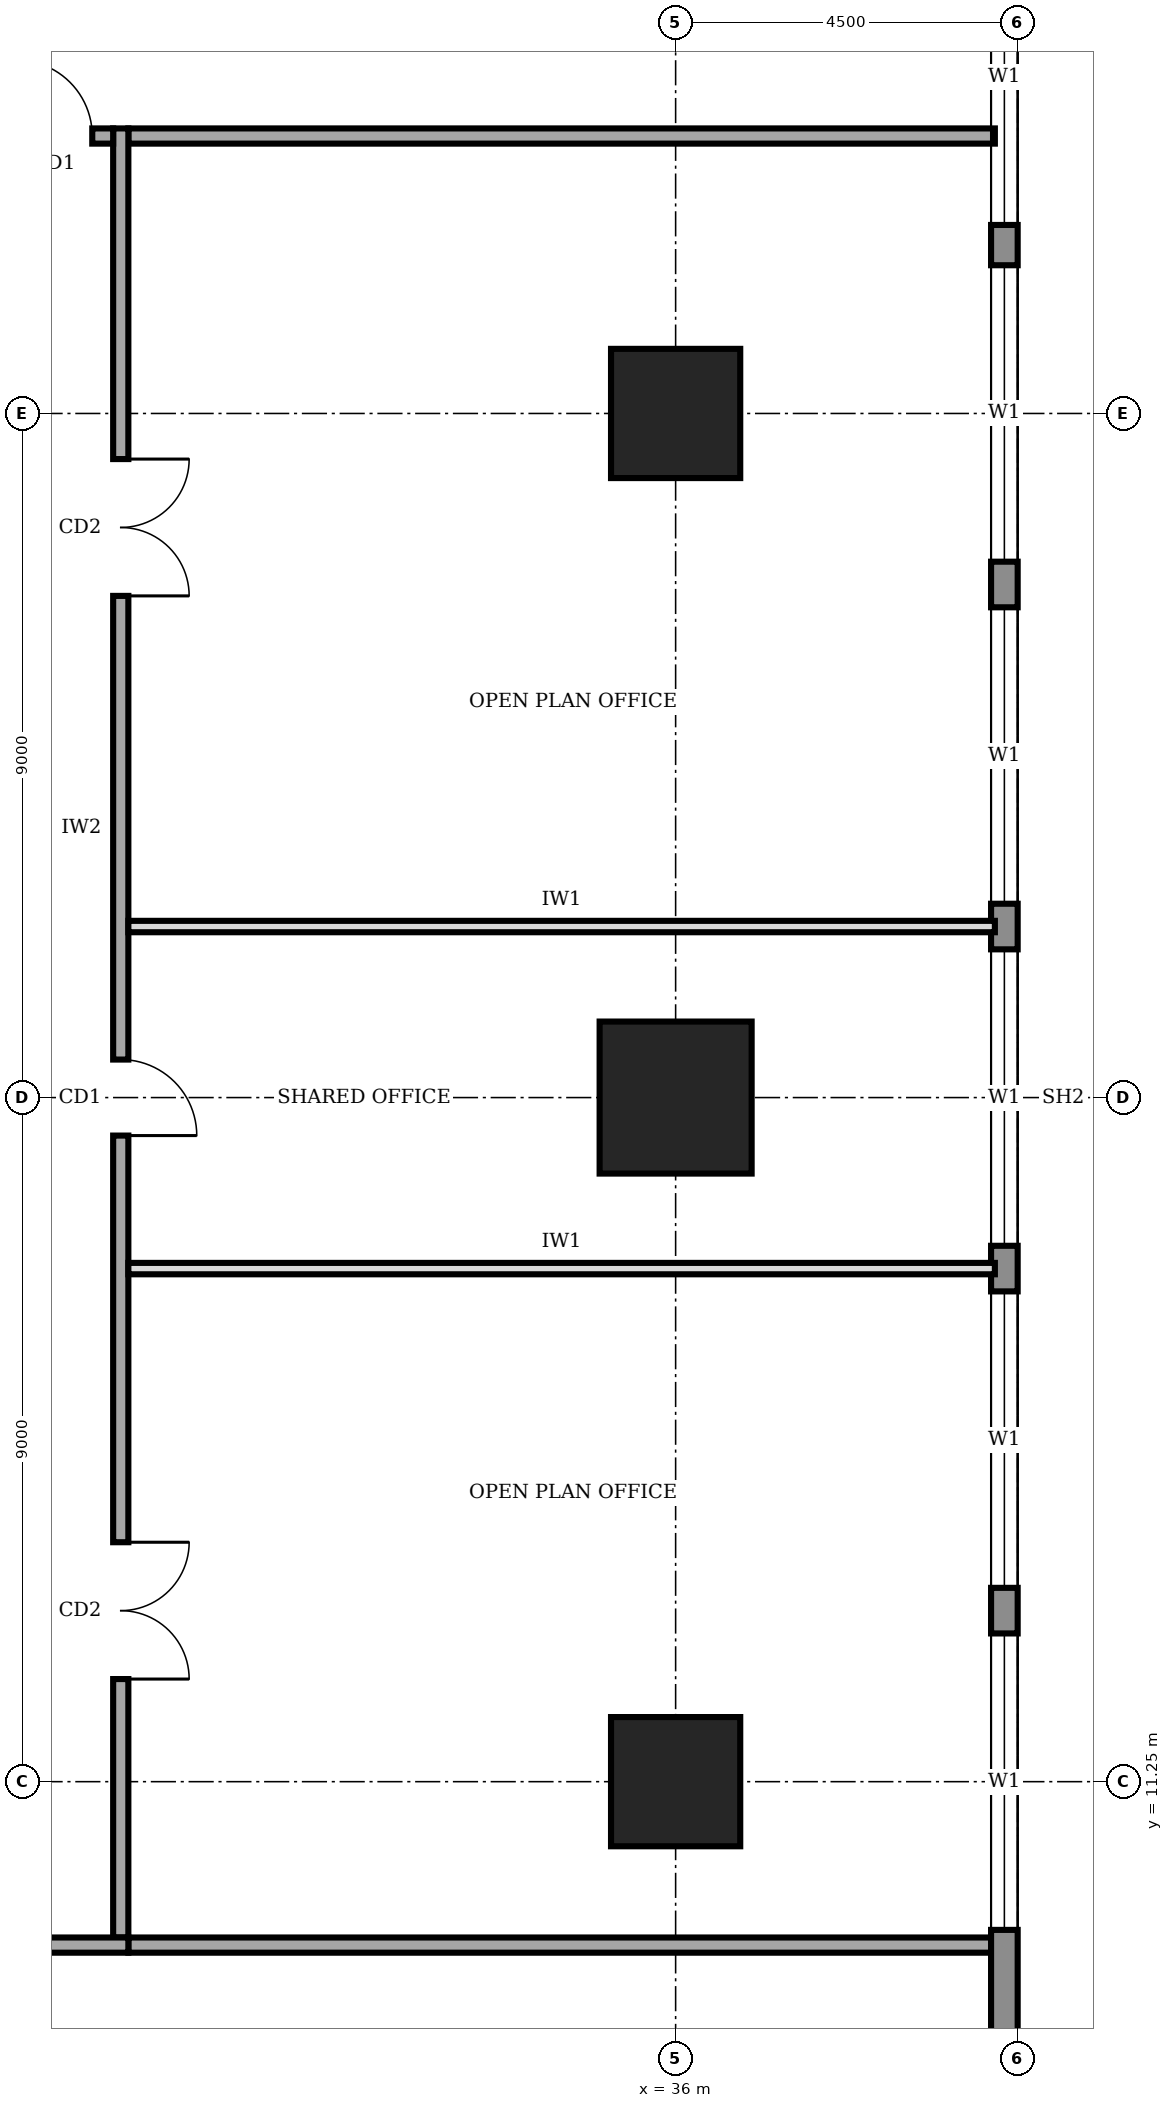
"""IFC4 building model, lengths in metres.
Left out: names, types, materials, properties, quantities, classifications, styles, units other than length and angle.
Written with IfcOpenShell. Run it as: python <this file> out.ifc"""

import sys

from ifc_helpers import new_model, si_unit, direction, frame, frame_2d, origin, origin_2d, place, context, subcontext, project, spatial, rectangle, extrude, element, fill, save


model = new_model("IFC4")
c1 = context("Model", 3, precision=1e-05, world=origin(), true_north=direction((0.0, 1.0)))
c2 = subcontext(c1, "Body", "Model", "MODEL_VIEW")
j1 = project(units=[si_unit("LENGTHUNIT", "METRE"), si_unit("PLANEANGLEUNIT", "RADIAN")], contexts=[c1])
p1 = place(None, origin())
s1 = spatial("IfcSite", under=j1, at=p1, CompositionType="ELEMENT")
p2 = place(p1, origin())
s2 = spatial("IfcBuilding", under=s1, at=p2, CompositionType="ELEMENT")
p3 = place(p2, frame((0.0, 0.0, 277.0)))
s3 = spatial("IfcBuildingStorey", under=s2, at=p3, CompositionType="ELEMENT", Elevation=277.0)
p4 = place(p3, frame((36.0, 11.25, 0.0), z_axis=(0.0, 0.0, 1.0), x_axis=(1.0, 0.0, 0.0)))
e1 = element("IfcColumn", 1, at=p4, inside=s3, PredefinedType="COLUMN", context=c2, shape_type="SweptSolid", body=[
    extrude(rectangle(XDim=1.7, YDim=1.7, at=origin_2d()), origin(), (0.0, 0.0, 1.0), 4.0),
])
p5 = place(p3, frame((36.0, 20.25, 0.0), z_axis=(0.0, 0.0, 1.0), x_axis=(1.0, 0.0, 0.0)))
e2 = element("IfcColumn", 2, at=p5, inside=s3, PredefinedType="COLUMN", context=c2, shape_type="SweptSolid", body=[
    extrude(rectangle(XDim=2.0, YDim=2.0, at=origin_2d()), origin(), (0.0, 0.0, 1.0), 4.0),
])
p6 = place(p3, frame((36.0, 29.25, 0.0), z_axis=(0.0, 0.0, 1.0), x_axis=(1.0, 0.0, 0.0)))
e3 = element("IfcColumn", 3, at=p6, inside=s3, PredefinedType="COLUMN", context=c2, shape_type="SweptSolid", body=[
    extrude(rectangle(XDim=1.7, YDim=1.7, at=origin_2d()), origin(), (0.0, 0.0, 1.0), 4.0),
])
p7 = place(p3, frame((40.325, 4.52, 0.0), z_axis=(0.0, 0.0, 1.0), x_axis=(0.0, 1.0, 0.0)))
e4 = element("IfcWall", 4, at=p7, inside=s3, PredefinedType="STANDARD", context=c2, shape_type="SweptSolid", body=[
    extrude(rectangle(XDim=31.46, YDim=0.35, at=frame_2d((15.73, 0.0))), origin(), (0.0, 0.0, 1.0), 3.75),
])
p8 = place(p7, frame((4.78, 0.0, 0.9)))
e5 = element("IfcOpeningElement", 5, at=p8, cuts=e4, PredefinedType="OPENING", context=c2, shape_type="SweptSolid", body=[
    extrude(rectangle(XDim=3.9, YDim=2.2, at=frame_2d((1.95, 1.1))), frame((0.0, 0.185, 0.0), z_axis=(0.0, -1.0, 0.0), x_axis=(1.0, 0.0, 0.0)), (0.0, 0.0, 1.0), 0.37),
])
p9 = place(p7, frame((9.28, 0.0, 0.9)))
e6 = element("IfcOpeningElement", 6, at=p9, cuts=e4, PredefinedType="OPENING", context=c2, shape_type="SweptSolid", body=[
    extrude(rectangle(XDim=3.9, YDim=2.2, at=frame_2d((1.95, 1.1))), frame((0.0, 0.185, 0.0), z_axis=(0.0, -1.0, 0.0), x_axis=(1.0, 0.0, 0.0)), (0.0, 0.0, 1.0), 0.37),
])
p10 = place(p7, frame((13.78, 0.0, 0.9)))
e7 = element("IfcOpeningElement", 7, at=p10, cuts=e4, PredefinedType="OPENING", context=c2, shape_type="SweptSolid", body=[
    extrude(rectangle(XDim=3.9, YDim=2.2, at=frame_2d((1.95, 1.1))), frame((0.0, 0.185, 0.0), z_axis=(0.0, -1.0, 0.0), x_axis=(1.0, 0.0, 0.0)), (0.0, 0.0, 1.0), 0.37),
])
p11 = place(p7, frame((18.28, 0.0, 0.9)))
e8 = element("IfcOpeningElement", 8, at=p11, cuts=e4, PredefinedType="OPENING", context=c2, shape_type="SweptSolid", body=[
    extrude(rectangle(XDim=3.9, YDim=2.2, at=frame_2d((1.95, 1.1))), frame((0.0, 0.185, 0.0), z_axis=(0.0, -1.0, 0.0), x_axis=(1.0, 0.0, 0.0)), (0.0, 0.0, 1.0), 0.37),
])
p12 = place(p7, frame((22.78, 0.0, 0.9)))
e9 = element("IfcOpeningElement", 9, at=p12, cuts=e4, PredefinedType="OPENING", context=c2, shape_type="SweptSolid", body=[
    extrude(rectangle(XDim=3.9, YDim=2.2, at=frame_2d((1.95, 1.1))), frame((0.0, 0.185, 0.0), z_axis=(0.0, -1.0, 0.0), x_axis=(1.0, 0.0, 0.0)), (0.0, 0.0, 1.0), 0.37),
])
p13 = place(p7, frame((27.21, 0.0, 0.9)))
e10 = element("IfcOpeningElement", 10, at=p13, cuts=e4, PredefinedType="OPENING", context=c2, shape_type="SweptSolid", body=[
    extrude(rectangle(XDim=3.9, YDim=2.2, at=frame_2d((1.95, 1.1))), frame((0.0, 0.185, 0.0), z_axis=(0.0, -1.0, 0.0), x_axis=(1.0, 0.0, 0.0)), (0.0, 0.0, 1.0), 0.37),
])
p14 = place(p3, frame((11.9, 9.1, 0.0), z_axis=(0.0, 0.0, 1.0), x_axis=(1.0, 0.0, 0.0)))
e11 = element("IfcWall", 11, at=p14, inside=s3, PredefinedType="SOLIDWALL", context=c2, shape_type="SweptSolid", body=[
    extrude(rectangle(XDim=16.9, YDim=0.2, at=frame_2d((8.45, 0.0))), origin(), (0.0, 0.0, 1.0), 3.75),
])
p15 = place(p14, frame((0.275, 0.0, 0.0)))
e12 = element("IfcOpeningElement", 12, at=p15, cuts=e11, PredefinedType="OPENING", context=c2, shape_type="SweptSolid", body=[
    extrude(rectangle(XDim=1.0, YDim=2.1, at=frame_2d((0.5, 1.05))), frame((0.0, 0.11, 0.0), z_axis=(0.0, -1.0, 0.0), x_axis=(1.0, 0.0, 0.0)), (0.0, 0.0, 1.0), 0.22),
])
p16 = place(p14, frame((8.35, 0.0, 0.0)))
e13 = element("IfcOpeningElement", 13, at=p16, cuts=e11, PredefinedType="OPENING", context=c2, shape_type="SweptSolid", body=[
    extrude(rectangle(XDim=1.8, YDim=2.1, at=frame_2d((0.9, 1.05))), frame((0.0, 0.11, 0.0), z_axis=(0.0, -1.0, 0.0), x_axis=(1.0, 0.0, 0.0)), (0.0, 0.0, 1.0), 0.22),
])
p17 = place(p3, frame((28.7, 9.2, 0.0), z_axis=(0.0, 0.0, 1.0), x_axis=(0.0, 1.0, 0.0)))
e14 = element("IfcWall", 14, at=p17, inside=s3, PredefinedType="SOLIDWALL", context=c2, shape_type="SweptSolid", body=[
    extrude(rectangle(XDim=23.8, YDim=0.2, at=frame_2d((11.9, 0.0))), origin(), (0.0, 0.0, 1.0), 3.75),
])
p18 = place(p17, frame((3.4, 0.0, 0.0)))
e15 = element("IfcOpeningElement", 15, at=p18, cuts=e14, PredefinedType="OPENING", context=c2, shape_type="SweptSolid", body=[
    extrude(rectangle(XDim=1.8, YDim=2.1, at=frame_2d((0.9, 1.05))), frame((0.0, 0.11, 0.0), z_axis=(0.0, -1.0, 0.0), x_axis=(1.0, 0.0, 0.0)), (0.0, 0.0, 1.0), 0.22),
])
p19 = place(p17, frame((10.55, 0.0, 0.0)))
e16 = element("IfcOpeningElement", 16, at=p19, cuts=e14, PredefinedType="OPENING", context=c2, shape_type="SweptSolid", body=[
    extrude(rectangle(XDim=1.0, YDim=2.1, at=frame_2d((0.5, 1.05))), frame((0.0, 0.11, 0.0), z_axis=(0.0, -1.0, 0.0), x_axis=(1.0, 0.0, 0.0)), (0.0, 0.0, 1.0), 0.22),
])
p20 = place(p17, frame((17.65, 0.0, 0.0)))
e17 = element("IfcOpeningElement", 17, at=p20, cuts=e14, PredefinedType="OPENING", context=c2, shape_type="SweptSolid", body=[
    extrude(rectangle(XDim=1.8, YDim=2.1, at=frame_2d((0.9, 1.05))), frame((0.0, 0.11, 0.0), z_axis=(0.0, -1.0, 0.0), x_axis=(1.0, 0.0, 0.0)), (0.0, 0.0, 1.0), 0.22),
])
p21 = place(p3, frame((28.6, 32.9, 0.0), z_axis=(0.0, 0.0, 1.0), x_axis=(-1.0, 0.0, 0.0)))
e18 = element("IfcWall", 18, at=p21, inside=s3, PredefinedType="SOLIDWALL", context=c2, shape_type="SweptSolid", body=[
    extrude(rectangle(XDim=16.9, YDim=0.2, at=frame_2d((8.45, 0.0))), origin(), (0.0, 0.0, 1.0), 3.75),
])
p22 = place(p21, frame((15.425, 0.0, 0.0)))
e19 = element("IfcOpeningElement", 19, at=p22, cuts=e18, PredefinedType="OPENING", context=c2, shape_type="SweptSolid", body=[
    extrude(rectangle(XDim=1.0, YDim=2.1, at=frame_2d((0.5, 1.05))), frame((0.0, 0.11, 0.0), z_axis=(0.0, -1.0, 0.0), x_axis=(1.0, 0.0, 0.0)), (0.0, 0.0, 1.0), 0.22),
])
p23 = place(p21, frame((7.45, 0.0, 0.0)))
e20 = element("IfcOpeningElement", 20, at=p23, cuts=e18, PredefinedType="OPENING", context=c2, shape_type="SweptSolid", body=[
    extrude(rectangle(XDim=1.8, YDim=2.1, at=frame_2d((0.9, 1.05))), frame((0.0, 0.11, 0.0), z_axis=(0.0, -1.0, 0.0), x_axis=(1.0, 0.0, 0.0)), (0.0, 0.0, 1.0), 0.22),
])
p24 = place(p21, frame((0.275, 0.0, 0.0)))
e21 = element("IfcOpeningElement", 21, at=p24, cuts=e18, PredefinedType="OPENING", context=c2, shape_type="SweptSolid", body=[
    extrude(rectangle(XDim=1.0, YDim=2.1, at=frame_2d((0.5, 1.05))), frame((0.0, 0.11, 0.0), z_axis=(0.0, -1.0, 0.0), x_axis=(1.0, 0.0, 0.0)), (0.0, 0.0, 1.0), 0.22),
])
for number, where, z_axis, x_axis in (
    (22, (28.8, 9.1, 0.0), (0.0, 0.0, 1.0), (1.0, 0.0, 0.0)),
    (23, (28.8, 32.9, 0.0), (0.0, 0.0, 1.0), (1.0, 0.0, 0.0)),
):
    element("IfcWall", number, at=place(p3, frame(where, z_axis=z_axis, x_axis=x_axis)), inside=s3, PredefinedType="SOLIDWALL", context=c2, shape_type="SweptSolid", body=[
        extrude(rectangle(XDim=11.4, YDim=0.2, at=frame_2d((5.7, 0.0))), origin(), (0.0, 0.0, 1.0), 3.75),
    ])
for number, where, z_axis, x_axis in (
    (24, (28.8, 18.0, 0.0), (0.0, 0.0, 1.0), (1.0, 0.0, 0.0)),
    (25, (28.8, 22.5, 0.0), (0.0, 0.0, 1.0), (1.0, 0.0, 0.0)),
):
    element("IfcWall", number, at=place(p3, frame(where, z_axis=z_axis, x_axis=x_axis)), inside=s3, PredefinedType="PARTITIONING", context=c2, shape_type="SweptSolid", body=[
        extrude(rectangle(XDim=11.4, YDim=0.15, at=frame_2d((5.7, 0.0))), origin(), (0.0, 0.0, 1.0), 3.75),
    ])
p25 = place(p8, origin())
e26 = element("IfcWindow", 26, at=p25, inside=s3, PartitioningType="SINGLE_PANEL", PredefinedType="WINDOW", context=c2, shape_type="SweptSolid", body=[
    extrude(rectangle(XDim=3.9, YDim=2.2, at=frame_2d((1.95, 1.1))), frame((0.0, 0.03, 0.0), z_axis=(0.0, -1.0, 0.0), x_axis=(1.0, 0.0, 0.0)), (0.0, 0.0, 1.0), 0.06),
])
fill(e5, e26)
p26 = place(p9, origin())
e27 = element("IfcWindow", 27, at=p26, inside=s3, PartitioningType="SINGLE_PANEL", PredefinedType="WINDOW", context=c2, shape_type="SweptSolid", body=[
    extrude(rectangle(XDim=3.9, YDim=2.2, at=frame_2d((1.95, 1.1))), frame((0.0, 0.03, 0.0), z_axis=(0.0, -1.0, 0.0), x_axis=(1.0, 0.0, 0.0)), (0.0, 0.0, 1.0), 0.06),
])
fill(e6, e27)
p27 = place(p10, origin())
e28 = element("IfcWindow", 28, at=p27, inside=s3, PartitioningType="SINGLE_PANEL", PredefinedType="WINDOW", context=c2, shape_type="SweptSolid", body=[
    extrude(rectangle(XDim=3.9, YDim=2.2, at=frame_2d((1.95, 1.1))), frame((0.0, 0.03, 0.0), z_axis=(0.0, -1.0, 0.0), x_axis=(1.0, 0.0, 0.0)), (0.0, 0.0, 1.0), 0.06),
])
fill(e7, e28)
p28 = place(p11, origin())
e29 = element("IfcWindow", 29, at=p28, inside=s3, PartitioningType="SINGLE_PANEL", PredefinedType="WINDOW", context=c2, shape_type="SweptSolid", body=[
    extrude(rectangle(XDim=3.9, YDim=2.2, at=frame_2d((1.95, 1.1))), frame((0.0, 0.03, 0.0), z_axis=(0.0, -1.0, 0.0), x_axis=(1.0, 0.0, 0.0)), (0.0, 0.0, 1.0), 0.06),
])
fill(e8, e29)
p29 = place(p12, origin())
e30 = element("IfcWindow", 30, at=p29, inside=s3, PartitioningType="SINGLE_PANEL", PredefinedType="WINDOW", context=c2, shape_type="SweptSolid", body=[
    extrude(rectangle(XDim=3.9, YDim=2.2, at=frame_2d((1.95, 1.1))), frame((0.0, 0.03, 0.0), z_axis=(0.0, -1.0, 0.0), x_axis=(1.0, 0.0, 0.0)), (0.0, 0.0, 1.0), 0.06),
])
fill(e9, e30)
p30 = place(p13, origin())
e31 = element("IfcWindow", 31, at=p30, inside=s3, PartitioningType="SINGLE_PANEL", PredefinedType="WINDOW", context=c2, shape_type="SweptSolid", body=[
    extrude(rectangle(XDim=3.9, YDim=2.2, at=frame_2d((1.95, 1.1))), frame((0.0, 0.03, 0.0), z_axis=(0.0, -1.0, 0.0), x_axis=(1.0, 0.0, 0.0)), (0.0, 0.0, 1.0), 0.06),
])
fill(e10, e31)
p31 = place(p18, frame((1.8, 0.0, 0.0), z_axis=(0.0, 0.0, 1.0), x_axis=(-1.0, 0.0, 0.0)))
e32 = element("IfcDoor", 32, at=p31, inside=s3, OperationType="DOUBLE_DOOR_SINGLE_SWING", PredefinedType="DOOR", context=c2, shape_type="SweptSolid", body=[
    extrude(rectangle(XDim=1.8, YDim=2.1, at=frame_2d((0.9, 1.05))), frame((0.0, 0.025, 0.0), z_axis=(0.0, -1.0, 0.0), x_axis=(1.0, 0.0, 0.0)), (0.0, 0.0, 1.0), 0.05),
])
fill(e15, e32)
p32 = place(p19, frame((1.0, 0.0, 0.0), z_axis=(0.0, 0.0, 1.0), x_axis=(-1.0, 0.0, 0.0)))
e33 = element("IfcDoor", 33, at=p32, inside=s3, OperationType="SINGLE_SWING_RIGHT", PredefinedType="DOOR", context=c2, shape_type="SweptSolid", body=[
    extrude(rectangle(XDim=1.0, YDim=2.1, at=frame_2d((0.5, 1.05))), frame((0.0, 0.025, 0.0), z_axis=(0.0, -1.0, 0.0), x_axis=(1.0, 0.0, 0.0)), (0.0, 0.0, 1.0), 0.05),
])
fill(e16, e33)
p33 = place(p20, frame((1.8, 0.0, 0.0), z_axis=(0.0, 0.0, 1.0), x_axis=(-1.0, 0.0, 0.0)))
e34 = element("IfcDoor", 34, at=p33, inside=s3, OperationType="DOUBLE_DOOR_SINGLE_SWING", PredefinedType="DOOR", context=c2, shape_type="SweptSolid", body=[
    extrude(rectangle(XDim=1.8, YDim=2.1, at=frame_2d((0.9, 1.05))), frame((0.0, 0.025, 0.0), z_axis=(0.0, -1.0, 0.0), x_axis=(1.0, 0.0, 0.0)), (0.0, 0.0, 1.0), 0.05),
])
fill(e17, e34)
p34 = place(p24, frame((1.0, 0.0, 0.0), z_axis=(0.0, 0.0, 1.0), x_axis=(-1.0, 0.0, 0.0)))
e35 = element("IfcDoor", 35, at=p34, inside=s3, OperationType="SINGLE_SWING_LEFT", PredefinedType="DOOR", context=c2, shape_type="SweptSolid", body=[
    extrude(rectangle(XDim=1.0, YDim=2.1, at=frame_2d((0.5, 1.05))), frame((0.0, 0.025, 0.0), z_axis=(0.0, -1.0, 0.0), x_axis=(1.0, 0.0, 0.0)), (0.0, 0.0, 1.0), 0.05),
])
fill(e21, e35)
save(model, sys.argv[1])
